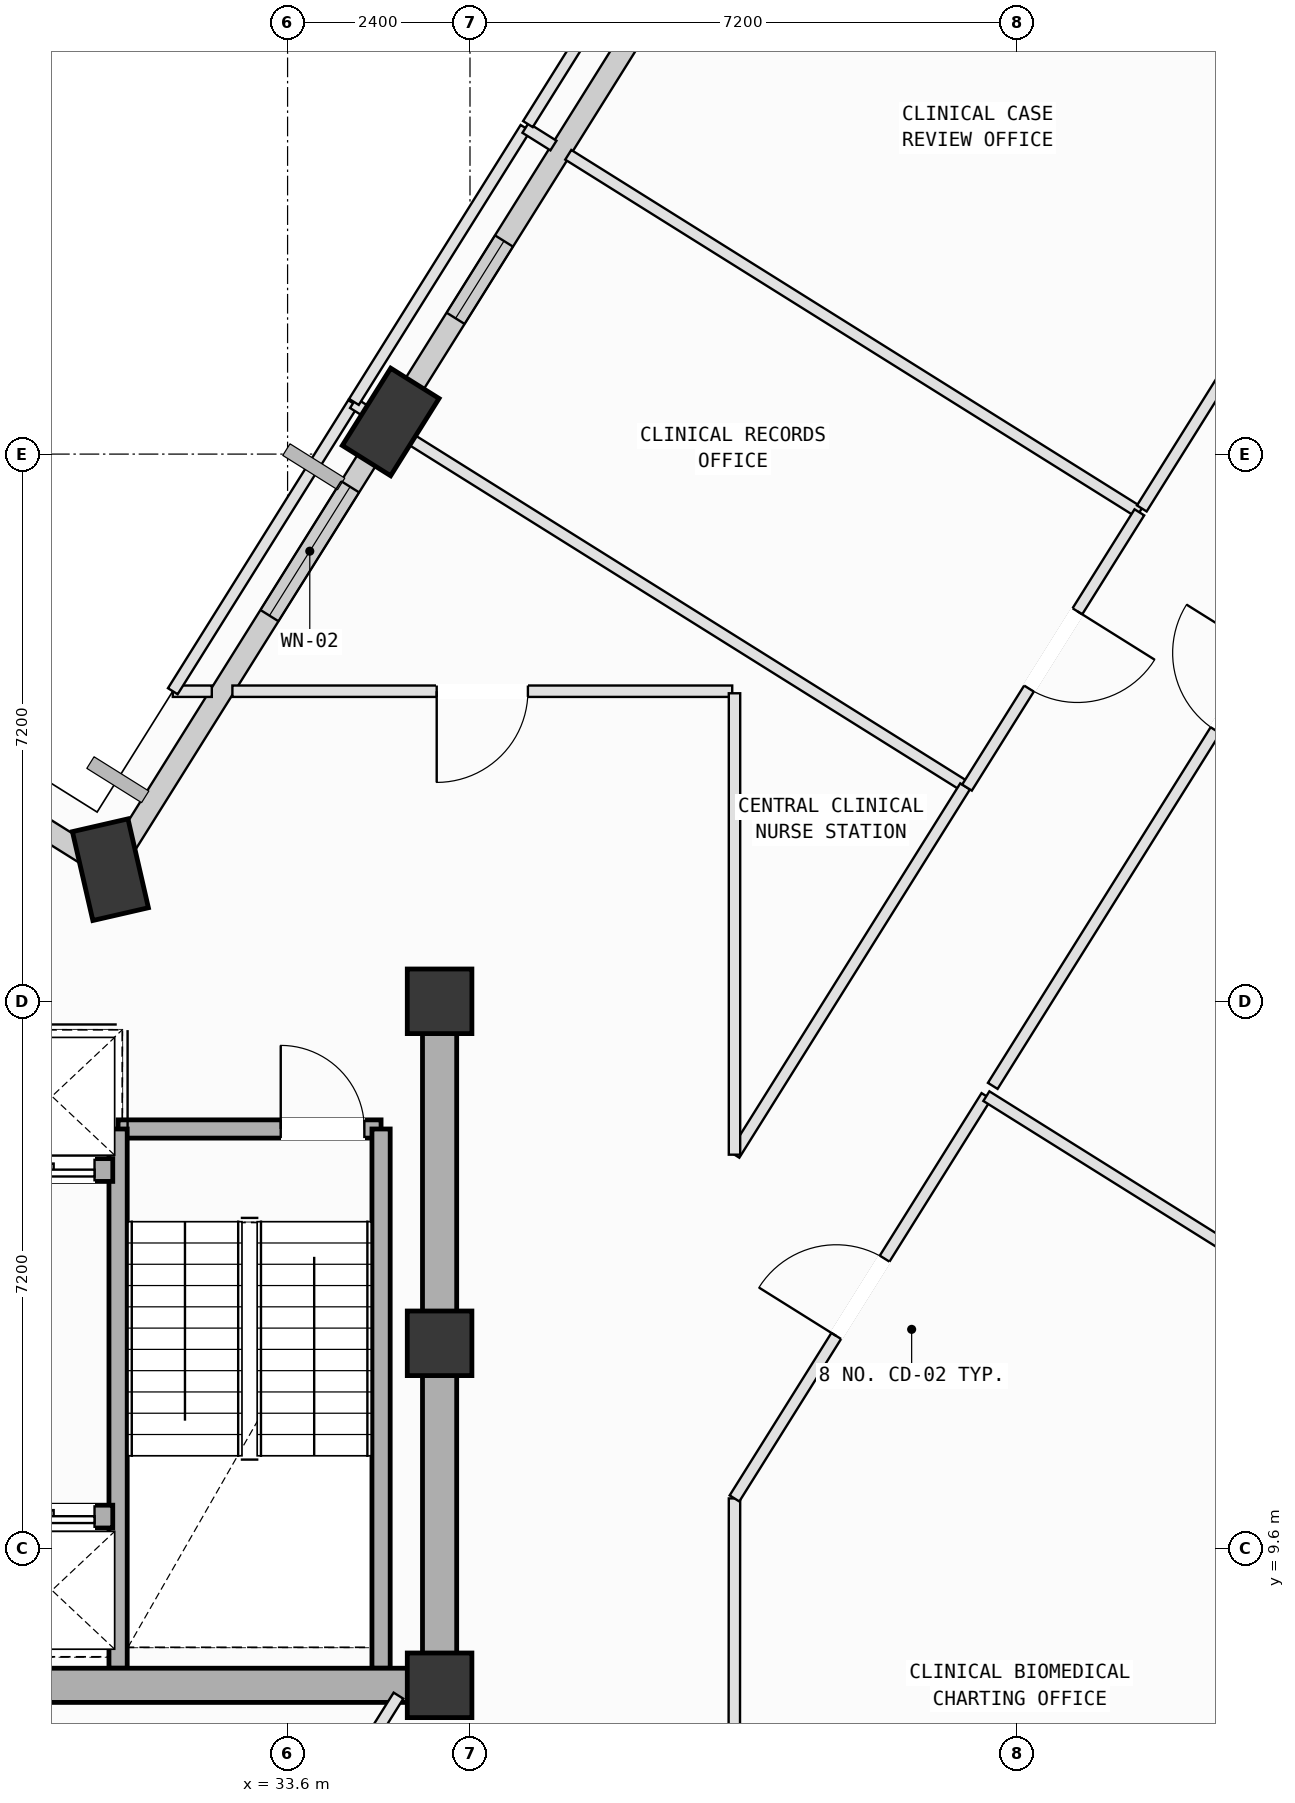
"""IFC4 building model, lengths in metres.
Left out: names, types, materials, properties, quantities, classifications, styles, units other than length and angle.
Written with IfcOpenShell. Run it as: python <this file> out.ifc"""

import sys

from ifc_helpers import new_model, si_unit, direction, frame, frame_2d, origin, origin_2d, place, context, subcontext, project, spatial, rectangle, extrude, element, fill, save


model = new_model("IFC4")
c1 = context("Model", 3, precision=1e-05, world=origin(), true_north=direction((0.0, 1.0)))
c2 = subcontext(c1, "Body", "Model", "MODEL_VIEW")
j1 = project(units=[si_unit("LENGTHUNIT", "METRE"), si_unit("PLANEANGLEUNIT", "RADIAN")], contexts=[c1])
p1 = place(None, origin())
s1 = spatial("IfcSite", under=j1, at=p1, CompositionType="ELEMENT")
p2 = place(p1, origin())
s2 = spatial("IfcBuilding", under=s1, at=p2, CompositionType="ELEMENT")
p3 = place(p2, frame((0.0, 0.0, 272.6)))
s3 = spatial("IfcBuildingStorey", under=s2, at=p3, CompositionType="ELEMENT", Elevation=272.6)
for number, where, z_axis, x_axis in (
    (1, (35.6, 7.8, 0.0), (0.0, 0.0, 1.0), (1.0, 0.0, 0.0)),
    (2, (35.6, 12.3, 0.0), (0.0, 0.0, 1.0), (1.0, 0.0, 0.0)),
    (3, (35.6, 16.8, 0.0), (0.0, 0.0, 1.0), (1.0, 0.0, 0.0)),
):
    element("IfcColumn", number, at=place(p3, frame(where, z_axis=z_axis, x_axis=x_axis)), inside=s3, PredefinedType="COLUMN", context=c2, shape_type="SweptSolid", body=[
        extrude(rectangle(XDim=0.85, YDim=0.85, at=origin_2d()), origin(), (0.0, 0.0, 1.0), 4.0),
    ])
p4 = place(p3, frame((34.957, 24.423, 0.007), z_axis=(0.001529119515, 0.005627159817, 0.999982998288), x_axis=(-0.73434726667, -0.678755967968, 0.004942457075)))
e4 = element("IfcColumn", 4, at=p4, inside=s3, PredefinedType="COLUMN", context=c2, shape_type="SweptSolid", body=[
    extrude(rectangle(XDim=1.2, YDim=0.75, at=origin_2d()), origin(), (0.0, 0.0, 1.0), 3.991),
])
p5 = place(p3, frame((31.269, 18.532, 0.021), z_axis=(0.026018264162, -0.009450029908, 0.999616800011), x_axis=(-0.992170858703, 0.121939395149, 0.026977232102)))
e5 = element("IfcColumn", 5, at=p5, inside=s3, PredefinedType="COLUMN", context=c2, shape_type="SweptSolid", body=[
    extrude(rectangle(XDim=1.2, YDim=0.75, at=origin_2d()), origin(), (0.0, 0.0, 1.0), 3.979),
])
p6 = place(p3, frame((35.173, 24.769, 0.0), z_axis=(0.0, 0.0, 1.0), x_axis=(0.530669842766, 0.84757862053, 0.0)))
e6 = element("IfcWall", 6, at=p6, inside=s3, PredefinedType="SOLIDWALL", context=c2, shape_type="SweptSolid", body=[
    extrude(rectangle(XDim=6.41, YDim=0.28, at=frame_2d((3.205, 0.0))), origin(), (0.0, 0.0, 1.0), 2.765),
])
p7 = place(p6, frame((1.201, 0.0, 0.75)))
e7 = element("IfcOpeningElement", 7, at=p7, cuts=e6, PredefinedType="OPENING", context=c2, shape_type="SweptSolid", body=[
    extrude(rectangle(XDim=1.2, YDim=1.75, at=frame_2d((0.6, 0.875))), frame((0.0, 0.15, 0.0), z_axis=(0.0, -1.0, 0.0), x_axis=(1.0, 0.0, 0.0)), (0.0, 0.0, 1.0), 0.3),
])
p8 = place(p3, frame((31.484, 18.875, 0.0), z_axis=(0.0, 0.0, 1.0), x_axis=(0.530640225781, 0.847597163034, 0.0)))
e8 = element("IfcWall", 8, at=p8, inside=s3, PredefinedType="SOLIDWALL", context=c2, shape_type="SweptSolid", body=[
    extrude(rectangle(XDim=6.158, YDim=0.28, at=frame_2d((3.079, 0.0))), origin(), (0.0, 0.0, 1.0), 3.265),
])
p9 = place(p8, frame((3.539, 0.0, 0.75)))
e9 = element("IfcOpeningElement", 9, at=p9, cuts=e8, PredefinedType="OPENING", context=c2, shape_type="SweptSolid", body=[
    extrude(rectangle(XDim=2.0, YDim=1.95, at=frame_2d((1.0, 0.975))), frame((0.0, 0.15, 0.0), z_axis=(0.0, -1.0, 0.0), x_axis=(1.0, 0.0, 0.0)), (0.0, 0.0, 1.0), 0.3),
])
p10 = place(p3, frame((25.08, 22.406, 0.0), z_axis=(0.0, 0.0, 1.0), x_axis=(0.847580141129, -0.530667414077, 0.0)))
e10 = element("IfcWall", 10, at=p10, inside=s3, PredefinedType="SOLIDWALL", context=c2, shape_type="SweptSolid", body=[
    extrude(rectangle(XDim=6.958, YDim=0.28, at=frame_2d((3.479, 0.0))), origin(), (0.0, 0.0, 1.0), 2.765),
])
p11 = place(p3, frame((31.37, 15.12, 0.0), z_axis=(0.0, 0.0, 1.0), x_axis=(1.0, 0.0, 0.0)))
e11 = element("IfcWall", 11, at=p11, inside=s3, PredefinedType="SOLIDWALL", context=c2, shape_type="SweptSolid", body=[
    extrude(rectangle(XDim=3.46, YDim=0.24, at=frame_2d((1.73, 0.0))), origin(), (0.0, 0.0, 1.0), 3.78),
])
p12 = place(p11, frame((2.14, 0.0, 0.0)))
e12 = element("IfcOpeningElement", 12, at=p12, cuts=e11, PredefinedType="OPENING", context=c2, shape_type="SweptSolid", body=[
    extrude(rectangle(XDim=1.1, YDim=2.15, at=frame_2d((0.55, 1.075))), frame((0.0, 0.13, 0.0), z_axis=(0.0, -1.0, 0.0), x_axis=(1.0, 0.0, 0.0)), (0.0, 0.0, 1.0), 0.26),
])
for number, where, z_axis, x_axis in (
    (13, (34.83, 15.12, 0.0), (0.0, 0.0, 1.0), (0.0, -1.0, 0.0)),
    (14, (31.37, 8.025, 0.0), (0.0, 0.0, 1.0), (0.0, 1.0, 0.0)),
):
    element("IfcWall", number, at=place(p3, frame(where, z_axis=z_axis, x_axis=x_axis)), inside=s3, PredefinedType="SOLIDWALL", context=c2, shape_type="SweptSolid", body=[
        extrude(rectangle(XDim=7.095, YDim=0.24, at=frame_2d((3.548, 0.0))), origin(), (0.0, 0.0, 1.0), 3.78),
    ])
p13 = place(p3, frame((24.8, 7.8, 0.0), z_axis=(0.0, 0.0, 1.0), x_axis=(1.0, 0.0, 0.0)))
e15 = element("IfcWall", 15, at=p13, inside=s3, PredefinedType="SHEAR", context=c2, shape_type="SweptSolid", body=[
    extrude(rectangle(XDim=10.8, YDim=0.45, at=frame_2d((5.4, 0.0))), origin(), (0.0, 0.0, 1.0), 3.78),
])
p14 = place(p3, frame((35.6, 7.8, 0.0), z_axis=(0.0, 0.0, 1.0), x_axis=(0.0, 1.0, 0.0)))
e16 = element("IfcWall", 16, at=p14, inside=s3, PredefinedType="SHEAR", context=c2, shape_type="SweptSolid", body=[
    extrude(rectangle(XDim=9.0, YDim=0.45, at=frame_2d((4.5, 0.0))), origin(), (0.0, 0.0, 1.0), 3.78),
])
p15 = place(p3, frame((29.6, 10.02, 0.0), z_axis=(0.0, 0.0, 1.0), x_axis=(1.0, 0.0, 0.0)))
e17 = element("IfcWall", 17, at=p15, inside=s3, PredefinedType="SOLIDWALL", context=c2, shape_type="SweptSolid", body=[
    extrude(rectangle(XDim=1.7, YDim=0.3, at=frame_2d((0.85, 0.0))), origin(), (0.0, 0.0, 1.0), 3.78),
])
p16 = place(p15, frame((0.34, 0.0, 0.0)))
e18 = element("IfcOpeningElement", 18, at=p16, cuts=e17, PredefinedType="OPENING", context=c2, shape_type="SweptSolid", body=[
    extrude(rectangle(XDim=1.12, YDim=2.15, at=frame_2d((0.56, 1.075))), frame((0.0, 0.16, 0.0), z_axis=(0.0, -1.0, 0.0), x_axis=(1.0, 0.0, 0.0)), (0.0, 0.0, 1.0), 0.32),
])
p17 = place(p3, frame((25.85, 14.58, 0.0), z_axis=(0.0, 0.0, 1.0), x_axis=(1.0, 0.0, 0.0)))
e19 = element("IfcWall", 19, at=p17, inside=s3, PredefinedType="SOLIDWALL", context=c2, shape_type="SweptSolid", body=[
    extrude(rectangle(XDim=5.45, YDim=0.3, at=frame_2d((2.725, 0.0))), origin(), (0.0, 0.0, 1.0), 3.78),
])
p18 = place(p17, frame((4.09, 0.0, 0.0)))
e20 = element("IfcOpeningElement", 20, at=p18, cuts=e19, PredefinedType="OPENING", context=c2, shape_type="SweptSolid", body=[
    extrude(rectangle(XDim=1.12, YDim=2.15, at=frame_2d((0.56, 1.075))), frame((0.0, 0.16, 0.0), z_axis=(0.0, -1.0, 0.0), x_axis=(1.0, 0.0, 0.0)), (0.0, 0.0, 1.0), 0.32),
])
p19 = place(p3, frame((39.476, 5.186, 0.0), z_axis=(0.0, 0.0, 1.0), x_axis=(0.000770007953, 0.999999703544, 0.0)))
e21 = element("IfcWall", 21, at=p19, inside=s3, PredefinedType="PARTITIONING", context=c2, shape_type="SweptSolid", body=[
    extrude(rectangle(XDim=5.073, YDim=0.15, at=frame_2d((2.537, 0.0))), origin(), (0.0, 0.0, 1.0), 3.78),
])
p20 = place(p3, frame((39.48, 10.259, 0.0), z_axis=(0.0, 0.0, 1.0), x_axis=(0.530673487846, 0.84757633833, 0.0)))
e22 = element("IfcWall", 22, at=p20, inside=s3, PredefinedType="PARTITIONING", context=c2, shape_type="SweptSolid", body=[
    extrude(rectangle(XDim=6.245, YDim=0.15, at=frame_2d((3.123, 0.0))), origin(), (0.0, 0.0, 1.0), 3.78),
])
p21 = place(p20, frame((2.522, 0.0, 0.0)))
e23 = element("IfcOpeningElement", 23, at=p21, cuts=e22, PredefinedType="OPENING", context=c2, shape_type="SweptSolid", body=[
    extrude(rectangle(XDim=1.2, YDim=2.15, at=frame_2d((0.6, 1.075))), frame((0.0, 0.085, 0.0), z_axis=(0.0, -1.0, 0.0), x_axis=(1.0, 0.0, 0.0)), (0.0, 0.0, 1.0), 0.17),
])
p22 = place(p3, frame((42.794, 15.552, 0.0), z_axis=(0.0, 0.0, 1.0), x_axis=(0.84754648377, -0.530721167704, 0.0)))
e24 = element("IfcWall", 24, at=p22, inside=s3, PredefinedType="PARTITIONING", context=c2, shape_type="SweptSolid", body=[
    extrude(rectangle(XDim=9.447, YDim=0.15, at=frame_2d((4.724, 0.0))), origin(), (0.0, 0.0, 1.0), 3.78),
])
p23 = place(p3, frame((42.878, 15.687, 0.0), z_axis=(0.0, 0.0, 1.0), x_axis=(0.530687191851, 0.847567758002, 0.0)))
e25 = element("IfcWall", 25, at=p23, inside=s3, PredefinedType="PARTITIONING", context=c2, shape_type="SweptSolid", body=[
    extrude(rectangle(XDim=12.241, YDim=0.15, at=frame_2d((6.121, 0.0))), origin(), (0.0, 0.0, 1.0), 3.415),
])
p24 = place(p23, frame((5.521, 0.0, 0.0)))
e26 = element("IfcOpeningElement", 26, at=p24, cuts=e25, PredefinedType="OPENING", context=c2, shape_type="SweptSolid", body=[
    extrude(rectangle(XDim=1.2, YDim=2.15, at=frame_2d((0.6, 1.075))), frame((0.0, 0.085, 0.0), z_axis=(0.0, -1.0, 0.0), x_axis=(1.0, 0.0, 0.0)), (0.0, 0.0, 1.0), 0.17),
])
p25 = place(p3, frame((23.452, 7.675, 0.0), z_axis=(0.0, 0.0, 1.0), x_axis=(0.847604512147, -0.530628486786, 0.0)))
e27 = element("IfcWall", 27, at=p25, inside=s3, PredefinedType="PARTITIONING", context=c2, shape_type="SweptSolid", body=[
    extrude(rectangle(XDim=11.954, YDim=0.15, at=frame_2d((5.977, 0.0))), origin(), (0.0, 0.0, 1.0), 3.415),
])
p26 = place(p25, frame((5.867, 0.0, 0.0)))
e28 = element("IfcOpeningElement", 28, at=p26, cuts=e27, PredefinedType="OPENING", context=c2, shape_type="SweptSolid", body=[
    extrude(rectangle(XDim=0.86, YDim=2.06, at=frame_2d((0.43, 1.03))), frame((0.0, 0.085, 0.0), z_axis=(0.0, -1.0, 0.0), x_axis=(1.0, 0.0, 0.0)), (0.0, 0.0, 1.0), 0.17),
])
p27 = place(p3, frame((39.45, 20.88, 0.0), z_axis=(0.0, 0.0, 1.0), x_axis=(-1.0, 0.0, 0.0)))
e29 = element("IfcWall", 29, at=p27, inside=s3, PredefinedType="PARTITIONING", context=c2, shape_type="SweptSolid", body=[
    extrude(rectangle(XDim=6.576, YDim=0.15, at=frame_2d((3.288, 0.0))), origin(), (0.0, 0.0, 1.0), 3.78),
])
p28 = place(p27, frame((2.688, 0.0, 0.0)))
e30 = element("IfcOpeningElement", 30, at=p28, cuts=e29, PredefinedType="OPENING", context=c2, shape_type="SweptSolid", body=[
    extrude(rectangle(XDim=1.2, YDim=2.15, at=frame_2d((0.6, 1.075))), frame((0.0, 0.085, 0.0), z_axis=(0.0, -1.0, 0.0), x_axis=(1.0, 0.0, 0.0)), (0.0, 0.0, 1.0), 0.17),
])
p29 = place(p3, frame((32.603, 20.88, 0.0), z_axis=(0.0, 0.0, 1.0), x_axis=(-1.0, 0.0, 0.0)))
e31 = element("IfcWall", 31, at=p29, inside=s3, PredefinedType="PARTITIONING", context=c2, shape_type="SweptSolid", body=[
    extrude(rectangle(XDim=0.513, YDim=0.15, at=frame_2d((0.256, 0.0))), origin(), (0.0, 0.0, 1.0), 3.78),
])
p30 = place(p3, frame((32.09, 20.88, 0.0), z_axis=(0.0, 0.0, 1.0), x_axis=(0.530489684634, 0.847691391072, 0.0)))
e32 = element("IfcWall", 32, at=p30, inside=s3, PredefinedType="PARTITIONING", context=c2, shape_type="SweptSolid", body=[
    extrude(rectangle(XDim=4.471, YDim=0.15, at=frame_2d((2.235, 0.0))), origin(), (0.0, 0.0, 1.0), 3.78),
])
p31 = place(p3, frame((34.462, 24.67, 0.0), z_axis=(0.0, 0.0, 1.0), x_axis=(0.847549004831, -0.53071714162, 0.0)))
e33 = element("IfcWall", 33, at=p31, inside=s3, PredefinedType="PARTITIONING", context=c2, shape_type="SweptSolid", body=[
    extrude(rectangle(XDim=9.5, YDim=0.15, at=frame_2d((4.75, 0.0))), origin(), (0.0, 0.0, 1.0), 3.78),
])
p32 = place(p3, frame((42.514, 19.628, 0.0), z_axis=(0.0, 0.0, 1.0), x_axis=(-0.530655141338, -0.847587824931, 0.0)))
e34 = element("IfcWall", 34, at=p32, inside=s3, PredefinedType="PARTITIONING", context=c2, shape_type="SweptSolid", body=[
    extrude(rectangle(XDim=5.717, YDim=0.15, at=frame_2d((2.859, 0.0))), origin(), (0.0, 0.0, 1.0), 3.78),
])
p33 = place(p3, frame((39.48, 14.782, 0.0), z_axis=(0.0, 0.0, 1.0), x_axis=(0.0, 1.0, 0.0)))
e35 = element("IfcWall", 35, at=p33, inside=s3, PredefinedType="PARTITIONING", context=c2, shape_type="SweptSolid", body=[
    extrude(rectangle(XDim=6.071, YDim=0.15, at=frame_2d((3.036, 0.0))), origin(), (0.0, 0.0, 1.0), 3.78),
])
p34 = place(p3, frame((35.059, 7.664, 0.0), z_axis=(0.0, 0.0, 1.0), x_axis=(-0.530661027952, -0.84758413943, 0.0)))
e36 = element("IfcWall", 36, at=p34, inside=s3, PredefinedType="PARTITIONING", context=c2, shape_type="SweptSolid", body=[
    extrude(rectangle(XDim=6.13, YDim=0.15, at=frame_2d((3.065, 0.0))), origin(), (0.0, 0.0, 1.0), 2.765),
])
p35 = place(p3, frame((34.473, 24.687, 0.0), z_axis=(0.0, 0.0, 1.0), x_axis=(0.530772811919, 0.84751414273, 0.0)))
e37 = element("IfcWall", 37, at=p35, inside=s3, PredefinedType="PARTITIONING", context=c2, shape_type="SweptSolid", body=[
    extrude(rectangle(XDim=4.252, YDim=0.15, at=frame_2d((2.126, 0.0))), origin(), (0.0, 0.0, 1.0), 3.78),
])
p36 = place(p3, frame((36.73, 28.291, 0.0), z_axis=(0.0, 0.0, 1.0), x_axis=(0.846954729699, -0.531665012804, 0.0)))
e38 = element("IfcWall", 38, at=p36, inside=s3, PredefinedType="PARTITIONING", context=c2, shape_type="SweptSolid", body=[
    extrude(rectangle(XDim=0.434, YDim=0.15, at=frame_2d((0.217, 0.0))), origin(), (0.0, 0.0, 1.0), 3.78),
])
p37 = place(p3, frame((37.293, 27.938, 0.0), z_axis=(0.0, 0.0, 1.0), x_axis=(0.847597339737, -0.530639943531, 0.0)))
e39 = element("IfcWall", 39, at=p37, inside=s3, PredefinedType="PARTITIONING", context=c2, shape_type="SweptSolid", body=[
    extrude(rectangle(XDim=8.865, YDim=0.15, at=frame_2d((4.433, 0.0))), origin(), (0.0, 0.0, 1.0), 3.78),
])
p38 = place(p3, frame((44.807, 23.234, 0.0), z_axis=(0.0, 0.0, 1.0), x_axis=(-0.530702319906, -0.847558285693, 0.0)))
e40 = element("IfcWall", 40, at=p38, inside=s3, PredefinedType="PARTITIONING", context=c2, shape_type="SweptSolid", body=[
    extrude(rectangle(XDim=4.273, YDim=0.15, at=frame_2d((2.137, 0.0))), origin(), (0.0, 0.0, 1.0), 3.78),
])
p39 = place(p38, frame((1.537, 0.0, 0.0)))
e41 = element("IfcOpeningElement", 41, at=p39, cuts=e40, PredefinedType="OPENING", context=c2, shape_type="SweptSolid", body=[
    extrude(rectangle(XDim=1.2, YDim=2.15, at=frame_2d((0.6, 1.075))), frame((0.0, 0.085, 0.0), z_axis=(0.0, -1.0, 0.0), x_axis=(1.0, 0.0, 0.0)), (0.0, 0.0, 1.0), 0.17),
])
p40 = place(p3, frame((36.762, 28.342, 0.0), z_axis=(0.0, 0.0, 1.0), x_axis=(0.530523539414, 0.847670203634, 0.0)))
e42 = element("IfcWall", 42, at=p40, inside=s3, PredefinedType="PARTITIONING", context=c2, shape_type="SweptSolid", body=[
    extrude(rectangle(XDim=6.19, YDim=0.15, at=frame_2d((3.095, 0.0))), origin(), (0.0, 0.0, 1.0), 2.765),
])
p41 = place(p3, frame((40.61, 33.236, 0.0), z_axis=(0.0, 0.0, 1.0), x_axis=(0.847597339737, -0.530639943531, 0.0)))
e43 = element("IfcWall", 43, at=p41, inside=s3, PredefinedType="PARTITIONING", context=c2, shape_type="SweptSolid", body=[
    extrude(rectangle(XDim=8.865, YDim=0.15, at=frame_2d((4.433, 0.0))), origin(), (0.0, 0.0, 1.0), 3.78),
])
p42 = place(p3, frame((48.124, 28.532, 0.0), z_axis=(0.0, 0.0, 1.0), x_axis=(-0.530636886246, -0.847599253749, 0.0)))
e44 = element("IfcWall", 44, at=p42, inside=s3, PredefinedType="PARTITIONING", context=c2, shape_type="SweptSolid", body=[
    extrude(rectangle(XDim=6.19, YDim=0.15, at=frame_2d((3.095, 0.0))), origin(), (0.0, 0.0, 1.0), 3.78),
])
p43 = place(p42, frame((2.495, 0.0, 0.0)))
e45 = element("IfcOpeningElement", 45, at=p43, cuts=e44, PredefinedType="OPENING", context=c2, shape_type="SweptSolid", body=[
    extrude(rectangle(XDim=1.2, YDim=2.15, at=frame_2d((0.6, 1.075))), frame((0.0, 0.085, 0.0), z_axis=(0.0, -1.0, 0.0), x_axis=(1.0, 0.0, 0.0)), (0.0, 0.0, 1.0), 0.17),
])
p44 = place(p7, origin())
e46 = element("IfcWindow", 46, at=p44, inside=s3, PartitioningType="SINGLE_PANEL", PredefinedType="WINDOW", context=c2, shape_type="SweptSolid", body=[
    extrude(rectangle(XDim=1.2, YDim=1.75, at=frame_2d((0.6, 0.875))), frame((0.0, 0.03, 0.0), z_axis=(0.0, -1.0, 0.0), x_axis=(1.0, 0.0, 0.0)), (0.0, 0.0, 1.0), 0.06),
])
fill(e7, e46)
p45 = place(p9, origin())
e47 = element("IfcWindow", 47, at=p45, inside=s3, PartitioningType="SINGLE_PANEL", PredefinedType="WINDOW", context=c2, shape_type="SweptSolid", body=[
    extrude(rectangle(XDim=2.0, YDim=1.95, at=frame_2d((1.0, 0.975))), frame((0.0, 0.03, 0.0), z_axis=(0.0, -1.0, 0.0), x_axis=(1.0, 0.0, 0.0)), (0.0, 0.0, 1.0), 0.06),
])
fill(e9, e47)
p46 = place(p12, origin())
e48 = element("IfcDoor", 48, at=p46, inside=s3, OperationType="SINGLE_SWING_LEFT", PredefinedType="DOOR", context=c2, shape_type="SweptSolid", body=[
    extrude(rectangle(XDim=1.1, YDim=2.15, at=frame_2d((0.55, 1.075))), frame((0.0, 0.025, 0.0), z_axis=(0.0, -1.0, 0.0), x_axis=(1.0, 0.0, 0.0)), (0.0, 0.0, 1.0), 0.05),
])
fill(e12, e48)
p47 = place(p16, origin())
e49 = element("IfcDoor", 49, at=p47, inside=s3, OperationType="DOUBLE_DOOR_SLIDING", PredefinedType="DOOR", context=c2, shape_type="SweptSolid", body=[
    extrude(rectangle(XDim=1.12, YDim=2.15, at=frame_2d((0.56, 1.075))), frame((0.0, 0.025, 0.0), z_axis=(0.0, -1.0, 0.0), x_axis=(1.0, 0.0, 0.0)), (0.0, 0.0, 1.0), 0.05),
])
fill(e18, e49)
p48 = place(p18, origin())
e50 = element("IfcDoor", 50, at=p48, inside=s3, OperationType="DOUBLE_DOOR_SLIDING", PredefinedType="DOOR", context=c2, shape_type="SweptSolid", body=[
    extrude(rectangle(XDim=1.12, YDim=2.15, at=frame_2d((0.56, 1.075))), frame((0.0, 0.025, 0.0), z_axis=(0.0, -1.0, 0.0), x_axis=(1.0, 0.0, 0.0)), (0.0, 0.0, 1.0), 0.05),
])
fill(e20, e50)
p49 = place(p21, origin())
e51 = element("IfcDoor", 51, at=p49, inside=s3, OperationType="SINGLE_SWING_LEFT", PredefinedType="DOOR", context=c2, shape_type="SweptSolid", body=[
    extrude(rectangle(XDim=1.2, YDim=2.15, at=frame_2d((0.6, 1.075))), frame((0.0, 0.025, 0.0), z_axis=(0.0, -1.0, 0.0), x_axis=(1.0, 0.0, 0.0)), (0.0, 0.0, 1.0), 0.05),
])
fill(e23, e51)
p50 = place(p24, origin())
e52 = element("IfcDoor", 52, at=p50, inside=s3, OperationType="SINGLE_SWING_RIGHT", PredefinedType="DOOR", context=c2, shape_type="SweptSolid", body=[
    extrude(rectangle(XDim=1.2, YDim=2.15, at=frame_2d((0.6, 1.075))), frame((0.0, 0.025, 0.0), z_axis=(0.0, -1.0, 0.0), x_axis=(1.0, 0.0, 0.0)), (0.0, 0.0, 1.0), 0.05),
])
fill(e26, e52)
p51 = place(p28, origin())
e53 = element("IfcDoor", 53, at=p51, inside=s3, OperationType="SINGLE_SWING_RIGHT", PredefinedType="DOOR", context=c2, shape_type="SweptSolid", body=[
    extrude(rectangle(XDim=1.2, YDim=2.15, at=frame_2d((0.6, 1.075))), frame((0.0, 0.025, 0.0), z_axis=(0.0, -1.0, 0.0), x_axis=(1.0, 0.0, 0.0)), (0.0, 0.0, 1.0), 0.05),
])
fill(e30, e53)
p52 = place(p39, origin())
e54 = element("IfcDoor", 54, at=p52, inside=s3, OperationType="SINGLE_SWING_LEFT", PredefinedType="DOOR", context=c2, shape_type="SweptSolid", body=[
    extrude(rectangle(XDim=1.2, YDim=2.15, at=frame_2d((0.6, 1.075))), frame((0.0, 0.025, 0.0), z_axis=(0.0, -1.0, 0.0), x_axis=(1.0, 0.0, 0.0)), (0.0, 0.0, 1.0), 0.05),
])
fill(e41, e54)
save(model, sys.argv[1])
